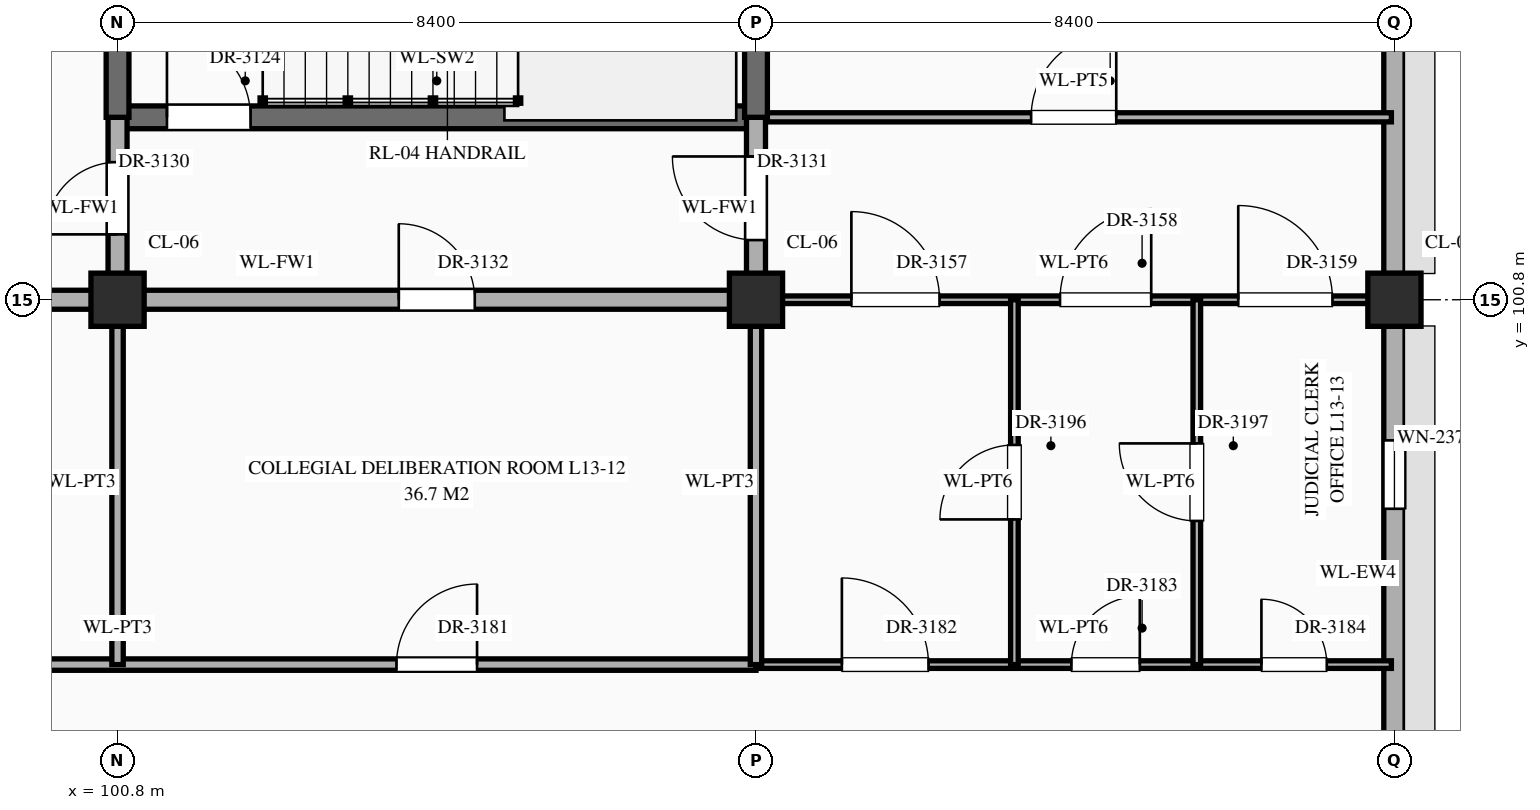
"""IFC4 building model, lengths in metres.
Left out: names, types, materials, properties, quantities, classifications, styles, units other than length and angle.
Written with IfcOpenShell. Run it as: python <this file> out.ifc"""

import sys

from ifc_helpers import new_model, si_unit, direction, frame, frame_2d, origin, origin_2d, place, context, subcontext, project, spatial, rectangle, extrude, element, fill, save


model = new_model("IFC4")
c1 = context("Model", 3, precision=1e-05, world=origin(), true_north=direction((0.0, 1.0)))
c2 = subcontext(c1, "Body", "Model", "MODEL_VIEW")
j1 = project(units=[si_unit("LENGTHUNIT", "METRE"), si_unit("PLANEANGLEUNIT", "RADIAN")], contexts=[c1])
p1 = place(None, origin())
s1 = spatial("IfcSite", under=j1, at=p1, CompositionType="ELEMENT")
p2 = place(p1, origin())
s2 = spatial("IfcBuilding", under=s1, at=p2, CompositionType="ELEMENT")
p3 = place(p2, frame((0.0, 0.0, 56.1)))
s3 = spatial("IfcBuildingStorey", under=s2, at=p3, CompositionType="ELEMENT", Elevation=56.1)
for number, where, z_axis, x_axis in (
    (1, (100.8, 100.8, 0.0), (0.0, 0.0, 1.0), (1.0, 0.0, 0.0)),
    (2, (109.2, 100.8, 0.0), (0.0, 0.0, 1.0), (1.0, 0.0, 0.0)),
    (3, (117.6, 100.8, 0.0), (0.0, 0.0, 1.0), (1.0, 0.0, 0.0)),
):
    element("IfcColumn", number, at=place(p3, frame(where, z_axis=z_axis, x_axis=x_axis)), inside=s3, PredefinedType="COLUMN", context=c2, shape_type="SweptSolid", body=[
        extrude(rectangle(XDim=0.7, YDim=0.7, at=origin_2d()), origin(), (0.0, 0.0, 1.0), 4.2),
    ])
p4 = place(p3, frame((117.6, 93.945, 0.0), z_axis=(0.0, 0.0, 1.0), x_axis=(0.0, 1.0, 0.0)))
e4 = element("IfcWall", 4, at=p4, inside=s3, PredefinedType="STANDARD", context=c2, shape_type="SweptSolid", body=[
    extrude(rectangle(XDim=6.51, YDim=0.28, at=frame_2d((3.255, 0.0))), origin(), (0.0, 0.0, 1.0), 3.2),
])
p5 = place(p4, frame((4.105, 0.0, 0.55)))
e5 = element("IfcOpeningElement", 5, at=p5, cuts=e4, PredefinedType="OPENING", context=c2, shape_type="SweptSolid", body=[
    extrude(rectangle(XDim=0.9, YDim=1.56, at=frame_2d((0.45, 0.78))), frame((0.0, 0.152, 0.0), z_axis=(0.0, -1.0, 0.0), x_axis=(1.0, 0.0, 0.0)), (0.0, 0.0, 1.0), 0.304),
])
p6 = place(p3, frame((117.6, 101.145, 0.0), z_axis=(0.0, 0.0, 1.0), x_axis=(0.0, 1.0, 0.0)))
e6 = element("IfcWall", 6, at=p6, inside=s3, PredefinedType="STANDARD", context=c2, shape_type="SweptSolid", body=[
    extrude(rectangle(XDim=6.51, YDim=0.28, at=frame_2d((3.255, 0.0))), origin(), (0.0, 0.0, 1.0), 3.2),
])
p7 = place(p6, frame((4.105, 0.0, 0.55)))
e7 = element("IfcOpeningElement", 7, at=p7, cuts=e6, PredefinedType="OPENING", context=c2, shape_type="SweptSolid", body=[
    extrude(rectangle(XDim=0.9, YDim=1.74, at=frame_2d((0.45, 0.87))), frame((0.0, 0.152, 0.0), z_axis=(0.0, -1.0, 0.0), x_axis=(1.0, 0.0, 0.0)), (0.0, 0.0, 1.0), 0.304),
])
p8 = place(p3, frame((92.4, 96.0, 0.0), z_axis=(0.0, 0.0, 1.0), x_axis=(1.0, 0.0, 0.0)))
e8 = element("IfcWall", 8, at=p8, inside=s3, PredefinedType="STANDARD", context=c2, shape_type="SweptSolid", body=[
    extrude(rectangle(XDim=16.8, YDim=0.15, at=frame_2d((8.4, 0.0))), origin(), (0.0, 0.0, 1.0), 3.96),
])
p9 = place(p8, frame((3.69, 0.0, 0.0)))
e9 = element("IfcOpeningElement", 9, at=p9, cuts=e8, PredefinedType="OPENING", context=c2, shape_type="SweptSolid", body=[
    extrude(rectangle(XDim=1.02, YDim=2.4, at=frame_2d((0.51, 1.2))), frame((0.0, 0.087, 0.0), z_axis=(0.0, -1.0, 0.0), x_axis=(1.0, 0.0, 0.0)), (0.0, 0.0, 1.0), 0.174),
])
p10 = place(p8, frame((12.07, 0.0, 0.0)))
e10 = element("IfcOpeningElement", 10, at=p10, cuts=e8, PredefinedType="OPENING", context=c2, shape_type="SweptSolid", body=[
    extrude(rectangle(XDim=1.06, YDim=2.4, at=frame_2d((0.53, 1.2))), frame((0.0, 0.087, 0.0), z_axis=(0.0, -1.0, 0.0), x_axis=(1.0, 0.0, 0.0)), (0.0, 0.0, 1.0), 0.174),
])
p11 = place(p3, frame((109.2, 96.0, 0.0), z_axis=(0.0, 0.0, 1.0), x_axis=(1.0, 0.0, 0.0)))
e11 = element("IfcWall", 11, at=p11, inside=s3, PredefinedType="STANDARD", context=c2, shape_type="SweptSolid", body=[
    extrude(rectangle(XDim=8.36, YDim=0.1, at=frame_2d((4.18, 0.0))), origin(), (0.0, 0.0, 1.0), 3.85),
])
p12 = place(p11, frame((1.13, 0.0, 0.0)))
e12 = element("IfcOpeningElement", 12, at=p12, cuts=e11, PredefinedType="OPENING", context=c2, shape_type="SweptSolid", body=[
    extrude(rectangle(XDim=1.14, YDim=2.4, at=frame_2d((0.57, 1.2))), frame((0.0, 0.062, 0.0), z_axis=(0.0, -1.0, 0.0), x_axis=(1.0, 0.0, 0.0)), (0.0, 0.0, 1.0), 0.124),
])
p13 = place(p11, frame((4.15, 0.0, 0.0)))
e13 = element("IfcOpeningElement", 13, at=p13, cuts=e11, PredefinedType="OPENING", context=c2, shape_type="SweptSolid", body=[
    extrude(rectangle(XDim=0.9, YDim=2.15, at=frame_2d((0.45, 1.075))), frame((0.0, 0.062, 0.0), z_axis=(0.0, -1.0, 0.0), x_axis=(1.0, 0.0, 0.0)), (0.0, 0.0, 1.0), 0.124),
])
p14 = place(p11, frame((6.65, 0.0, 0.0)))
e14 = element("IfcOpeningElement", 14, at=p14, cuts=e11, PredefinedType="OPENING", context=c2, shape_type="SweptSolid", body=[
    extrude(rectangle(XDim=0.86, YDim=2.1, at=frame_2d((0.43, 1.05))), frame((0.0, 0.062, 0.0), z_axis=(0.0, -1.0, 0.0), x_axis=(1.0, 0.0, 0.0)), (0.0, 0.0, 1.0), 0.124),
])
p15 = place(p3, frame((96.6, 100.8, 0.0), z_axis=(0.0, 0.0, 1.0), x_axis=(1.0, 0.0, 0.0)))
e15 = element("IfcWall", 15, at=p15, inside=s3, PredefinedType="STANDARD", context=c2, shape_type="SweptSolid", body=[
    extrude(rectangle(XDim=12.6, YDim=0.25, at=frame_2d((6.3, 0.0))), origin(), (0.0, 0.0, 1.0), 3.11),
])
p16 = place(p15, frame((7.9, 0.0, 0.0)))
e16 = element("IfcOpeningElement", 16, at=p16, cuts=e15, PredefinedType="OPENING", context=c2, shape_type="SweptSolid", body=[
    extrude(rectangle(XDim=1.0, YDim=2.2, at=frame_2d((0.5, 1.1))), frame((0.0, 0.137, 0.0), z_axis=(0.0, -1.0, 0.0), x_axis=(1.0, 0.0, 0.0)), (0.0, 0.0, 1.0), 0.274),
])
p17 = place(p3, frame((109.2, 100.8, 0.0), z_axis=(0.0, 0.0, 1.0), x_axis=(1.0, 0.0, 0.0)))
e17 = element("IfcWall", 17, at=p17, inside=s3, PredefinedType="STANDARD", context=c2, shape_type="SweptSolid", body=[
    extrude(rectangle(XDim=8.36, YDim=0.1, at=frame_2d((4.18, 0.0))), origin(), (0.0, 0.0, 1.0), 3.0),
])
p18 = place(p17, frame((1.255, 0.0, 0.0)))
e18 = element("IfcOpeningElement", 18, at=p18, cuts=e17, PredefinedType="OPENING", context=c2, shape_type="SweptSolid", body=[
    extrude(rectangle(XDim=1.16, YDim=2.3, at=frame_2d((0.58, 1.15))), frame((0.0, 0.062, 0.0), z_axis=(0.0, -1.0, 0.0), x_axis=(1.0, 0.0, 0.0)), (0.0, 0.0, 1.0), 0.124),
])
p19 = place(p17, frame((4.0, 0.0, 0.0)))
e19 = element("IfcOpeningElement", 19, at=p19, cuts=e17, PredefinedType="OPENING", context=c2, shape_type="SweptSolid", body=[
    extrude(rectangle(XDim=1.2, YDim=2.35, at=frame_2d((0.6, 1.175))), frame((0.0, 0.062, 0.0), z_axis=(0.0, -1.0, 0.0), x_axis=(1.0, 0.0, 0.0)), (0.0, 0.0, 1.0), 0.124),
])
p20 = place(p17, frame((6.345, 0.0, 0.0)))
e20 = element("IfcOpeningElement", 20, at=p20, cuts=e17, PredefinedType="OPENING", context=c2, shape_type="SweptSolid", body=[
    extrude(rectangle(XDim=1.24, YDim=2.3, at=frame_2d((0.62, 1.15))), frame((0.0, 0.062, 0.0), z_axis=(0.0, -1.0, 0.0), x_axis=(1.0, 0.0, 0.0)), (0.0, 0.0, 1.0), 0.124),
])
p21 = place(p3, frame((100.8, 103.2, 0.0), z_axis=(0.0, 0.0, 1.0), x_axis=(1.0, 0.0, 0.0)))
e21 = element("IfcWall", 21, at=p21, inside=s3, PredefinedType="SHEAR", context=c2, shape_type="SweptSolid", body=[
    extrude(rectangle(XDim=8.4, YDim=0.3, at=frame_2d((4.2, 0.0))), origin(), (0.0, 0.0, 1.0), 3.96),
])
p22 = place(p21, frame((0.65, 0.0, 0.0)))
e22 = element("IfcOpeningElement", 22, at=p22, cuts=e21, PredefinedType="OPENING", context=c2, shape_type="SweptSolid", body=[
    extrude(rectangle(XDim=1.1, YDim=2.2, at=frame_2d((0.55, 1.1))), frame((0.0, 0.162, 0.0), z_axis=(0.0, -1.0, 0.0), x_axis=(1.0, 0.0, 0.0)), (0.0, 0.0, 1.0), 0.324),
])
p23 = place(p3, frame((109.2, 103.2, 0.0), z_axis=(0.0, 0.0, 1.0), x_axis=(1.0, 0.0, 0.0)))
e23 = element("IfcWall", 23, at=p23, inside=s3, PredefinedType="STANDARD", context=c2, shape_type="SweptSolid", body=[
    extrude(rectangle(XDim=8.36, YDim=0.12, at=frame_2d((4.18, 0.0))), origin(), (0.0, 0.0, 1.0), 3.85),
])
p24 = place(p23, frame((3.62, 0.0, 0.0)))
e24 = element("IfcOpeningElement", 24, at=p24, cuts=e23, PredefinedType="OPENING", context=c2, shape_type="SweptSolid", body=[
    extrude(rectangle(XDim=1.12, YDim=2.25, at=frame_2d((0.56, 1.125))), frame((0.0, 0.072, 0.0), z_axis=(0.0, -1.0, 0.0), x_axis=(1.0, 0.0, 0.0)), (0.0, 0.0, 1.0), 0.144),
])
p25 = place(p3, frame((100.8, 96.0, 0.0), z_axis=(0.0, 0.0, 1.0), x_axis=(0.0, 1.0, 0.0)))
e25 = element("IfcWall", 25, at=p25, inside=s3, PredefinedType="STANDARD", context=c2, shape_type="SweptSolid", body=[
    extrude(rectangle(XDim=4.8, YDim=0.15, at=frame_2d((2.4, 0.0))), origin(), (0.0, 0.0, 1.0), 3.21),
])
p26 = place(p3, frame((100.8, 100.8, 0.0), z_axis=(0.0, 0.0, 1.0), x_axis=(0.0, 1.0, 0.0)))
e26 = element("IfcWall", 26, at=p26, inside=s3, PredefinedType="STANDARD", context=c2, shape_type="SweptSolid", body=[
    extrude(rectangle(XDim=2.4, YDim=0.25, at=frame_2d((1.2, 0.0))), origin(), (0.0, 0.0, 1.0), 3.21),
])
p27 = place(p26, frame((0.86, 0.0, 0.0)))
e27 = element("IfcOpeningElement", 27, at=p27, cuts=e26, PredefinedType="OPENING", context=c2, shape_type="SweptSolid", body=[
    extrude(rectangle(XDim=0.95, YDim=2.15, at=frame_2d((0.475, 1.075))), frame((0.0, 0.137, 0.0), z_axis=(0.0, -1.0, 0.0), x_axis=(1.0, 0.0, 0.0)), (0.0, 0.0, 1.0), 0.274),
])
p28 = place(p3, frame((100.8, 103.2, 0.0), z_axis=(0.0, 0.0, 1.0), x_axis=(0.0, 1.0, 0.0)))
e28 = element("IfcWall", 28, at=p28, inside=s3, PredefinedType="SHEAR", context=c2, shape_type="SweptSolid", body=[
    extrude(rectangle(XDim=1.2, YDim=0.3, at=frame_2d((0.6, 0.0))), origin(), (0.0, 0.0, 1.0), 3.96),
])
p29 = place(p3, frame((109.2, 96.0, 0.0), z_axis=(0.0, 0.0, 1.0), x_axis=(0.0, 1.0, 0.0)))
e29 = element("IfcWall", 29, at=p29, inside=s3, PredefinedType="STANDARD", context=c2, shape_type="SweptSolid", body=[
    extrude(rectangle(XDim=4.8, YDim=0.15, at=frame_2d((2.4, 0.0))), origin(), (0.0, 0.0, 1.0), 3.1),
])
p30 = place(p3, frame((109.2, 100.8, 0.0), z_axis=(0.0, 0.0, 1.0), x_axis=(0.0, 1.0, 0.0)))
e30 = element("IfcWall", 30, at=p30, inside=s3, PredefinedType="STANDARD", context=c2, shape_type="SweptSolid", body=[
    extrude(rectangle(XDim=2.4, YDim=0.25, at=frame_2d((1.2, 0.0))), origin(), (0.0, 0.0, 1.0), 3.1),
])
p31 = place(p30, frame((0.785, 0.0, 0.0)))
e31 = element("IfcOpeningElement", 31, at=p31, cuts=e30, PredefinedType="OPENING", context=c2, shape_type="SweptSolid", body=[
    extrude(rectangle(XDim=1.1, YDim=2.2, at=frame_2d((0.55, 1.1))), frame((0.0, 0.137, 0.0), z_axis=(0.0, -1.0, 0.0), x_axis=(1.0, 0.0, 0.0)), (0.0, 0.0, 1.0), 0.274),
])
p32 = place(p3, frame((109.2, 103.2, 0.0), z_axis=(0.0, 0.0, 1.0), x_axis=(0.0, 1.0, 0.0)))
e32 = element("IfcWall", 32, at=p32, inside=s3, PredefinedType="SHEAR", context=c2, shape_type="SweptSolid", body=[
    extrude(rectangle(XDim=4.76, YDim=0.3, at=frame_2d((2.38, 0.0))), origin(), (0.0, 0.0, 1.0), 3.96),
])
p33 = place(p3, frame((112.6, 96.0, 0.0), z_axis=(0.0, 0.0, 1.0), x_axis=(0.0, 1.0, 0.0)))
e33 = element("IfcWall", 33, at=p33, inside=s3, PredefinedType="STANDARD", context=c2, shape_type="SweptSolid", body=[
    extrude(rectangle(XDim=4.8, YDim=0.1, at=frame_2d((2.4, 0.0))), origin(), (0.0, 0.0, 1.0), 3.85),
])
p34 = place(p33, frame((1.91, 0.0, 0.0)))
e34 = element("IfcOpeningElement", 34, at=p34, cuts=e33, PredefinedType="OPENING", context=c2, shape_type="SweptSolid", body=[
    extrude(rectangle(XDim=0.98, YDim=2.35, at=frame_2d((0.49, 1.175))), frame((0.0, 0.062, 0.0), z_axis=(0.0, -1.0, 0.0), x_axis=(1.0, 0.0, 0.0)), (0.0, 0.0, 1.0), 0.124),
])
p35 = place(p3, frame((115.0, 96.0, 0.0), z_axis=(0.0, 0.0, 1.0), x_axis=(0.0, 1.0, 0.0)))
e35 = element("IfcWall", 35, at=p35, inside=s3, PredefinedType="STANDARD", context=c2, shape_type="SweptSolid", body=[
    extrude(rectangle(XDim=4.8, YDim=0.1, at=frame_2d((2.4, 0.0))), origin(), (0.0, 0.0, 1.0), 3.85),
])
p36 = place(p35, frame((1.89, 0.0, 0.0)))
e36 = element("IfcOpeningElement", 36, at=p36, cuts=e35, PredefinedType="OPENING", context=c2, shape_type="SweptSolid", body=[
    extrude(rectangle(XDim=1.02, YDim=2.4, at=frame_2d((0.51, 1.2))), frame((0.0, 0.062, 0.0), z_axis=(0.0, -1.0, 0.0), x_axis=(1.0, 0.0, 0.0)), (0.0, 0.0, 1.0), 0.124),
])
p37 = place(p5, origin())
e37 = element("IfcWindow", 37, at=p37, inside=s3, PartitioningType="SINGLE_PANEL", PredefinedType="WINDOW", context=c2, shape_type="SweptSolid", body=[
    extrude(rectangle(XDim=0.9, YDim=1.56, at=frame_2d((0.45, 0.78))), frame((0.0, 0.03, 0.0), z_axis=(0.0, -1.0, 0.0), x_axis=(1.0, 0.0, 0.0)), (0.0, 0.0, 1.0), 0.06),
])
fill(e5, e37)
p38 = place(p22, origin())
e38 = element("IfcDoor", 38, at=p38, inside=s3, OperationType="SINGLE_SWING_LEFT", PredefinedType="DOOR", context=c2, shape_type="SweptSolid", body=[
    extrude(rectangle(XDim=1.1, YDim=2.2, at=frame_2d((0.55, 1.1))), frame((0.0, 0.025, 0.0), z_axis=(0.0, -1.0, 0.0), x_axis=(1.0, 0.0, 0.0)), (0.0, 0.0, 1.0), 0.05),
])
fill(e22, e38)
p39 = place(p27, origin())
e39 = element("IfcDoor", 39, at=p39, inside=s3, OperationType="SINGLE_SWING_LEFT", PredefinedType="DOOR", context=c2, shape_type="SweptSolid", body=[
    extrude(rectangle(XDim=0.95, YDim=2.15, at=frame_2d((0.475, 1.075))), frame((0.0, 0.025, 0.0), z_axis=(0.0, -1.0, 0.0), x_axis=(1.0, 0.0, 0.0)), (0.0, 0.0, 1.0), 0.05),
])
fill(e27, e39)
p40 = place(p31, origin())
e40 = element("IfcDoor", 40, at=p40, inside=s3, OperationType="SINGLE_SWING_RIGHT", PredefinedType="DOOR", context=c2, shape_type="SweptSolid", body=[
    extrude(rectangle(XDim=1.1, YDim=2.2, at=frame_2d((0.55, 1.1))), frame((0.0, 0.025, 0.0), z_axis=(0.0, -1.0, 0.0), x_axis=(1.0, 0.0, 0.0)), (0.0, 0.0, 1.0), 0.05),
])
fill(e31, e40)
p41 = place(p16, origin())
e41 = element("IfcDoor", 41, at=p41, inside=s3, OperationType="SINGLE_SWING_LEFT", PredefinedType="DOOR", context=c2, shape_type="SweptSolid", body=[
    extrude(rectangle(XDim=1.0, YDim=2.2, at=frame_2d((0.5, 1.1))), frame((0.0, 0.025, 0.0), z_axis=(0.0, -1.0, 0.0), x_axis=(1.0, 0.0, 0.0)), (0.0, 0.0, 1.0), 0.05),
])
fill(e16, e41)
p42 = place(p24, origin())
e42 = element("IfcDoor", 42, at=p42, inside=s3, OperationType="SINGLE_SWING_RIGHT", PredefinedType="DOOR", context=c2, shape_type="SweptSolid", body=[
    extrude(rectangle(XDim=1.12, YDim=2.25, at=frame_2d((0.56, 1.125))), frame((0.0, 0.025, 0.0), z_axis=(0.0, -1.0, 0.0), x_axis=(1.0, 0.0, 0.0)), (0.0, 0.0, 1.0), 0.05),
])
fill(e24, e42)
p43 = place(p18, origin())
e43 = element("IfcDoor", 43, at=p43, inside=s3, OperationType="SINGLE_SWING_LEFT", PredefinedType="DOOR", context=c2, shape_type="SweptSolid", body=[
    extrude(rectangle(XDim=1.16, YDim=2.3, at=frame_2d((0.58, 1.15))), frame((0.0, 0.025, 0.0), z_axis=(0.0, -1.0, 0.0), x_axis=(1.0, 0.0, 0.0)), (0.0, 0.0, 1.0), 0.05),
])
fill(e18, e43)
p44 = place(p19, origin())
e44 = element("IfcDoor", 44, at=p44, inside=s3, OperationType="SINGLE_SWING_RIGHT", PredefinedType="DOOR", context=c2, shape_type="SweptSolid", body=[
    extrude(rectangle(XDim=1.2, YDim=2.35, at=frame_2d((0.6, 1.175))), frame((0.0, 0.025, 0.0), z_axis=(0.0, -1.0, 0.0), x_axis=(1.0, 0.0, 0.0)), (0.0, 0.0, 1.0), 0.05),
])
fill(e19, e44)
p45 = place(p20, origin())
e45 = element("IfcDoor", 45, at=p45, inside=s3, OperationType="SINGLE_SWING_LEFT", PredefinedType="DOOR", context=c2, shape_type="SweptSolid", body=[
    extrude(rectangle(XDim=1.24, YDim=2.3, at=frame_2d((0.62, 1.15))), frame((0.0, 0.025, 0.0), z_axis=(0.0, -1.0, 0.0), x_axis=(1.0, 0.0, 0.0)), (0.0, 0.0, 1.0), 0.05),
])
fill(e20, e45)
p46 = place(p10, origin())
e46 = element("IfcDoor", 46, at=p46, inside=s3, OperationType="SINGLE_SWING_RIGHT", PredefinedType="DOOR", context=c2, shape_type="SweptSolid", body=[
    extrude(rectangle(XDim=1.06, YDim=2.4, at=frame_2d((0.53, 1.2))), frame((0.0, 0.025, 0.0), z_axis=(0.0, -1.0, 0.0), x_axis=(1.0, 0.0, 0.0)), (0.0, 0.0, 1.0), 0.05),
])
fill(e10, e46)
p47 = place(p12, origin())
e47 = element("IfcDoor", 47, at=p47, inside=s3, OperationType="SINGLE_SWING_LEFT", PredefinedType="DOOR", context=c2, shape_type="SweptSolid", body=[
    extrude(rectangle(XDim=1.14, YDim=2.4, at=frame_2d((0.57, 1.2))), frame((0.0, 0.025, 0.0), z_axis=(0.0, -1.0, 0.0), x_axis=(1.0, 0.0, 0.0)), (0.0, 0.0, 1.0), 0.05),
])
fill(e12, e47)
p48 = place(p13, origin())
e48 = element("IfcDoor", 48, at=p48, inside=s3, OperationType="SINGLE_SWING_RIGHT", PredefinedType="DOOR", context=c2, shape_type="SweptSolid", body=[
    extrude(rectangle(XDim=0.9, YDim=2.15, at=frame_2d((0.45, 1.075))), frame((0.0, 0.025, 0.0), z_axis=(0.0, -1.0, 0.0), x_axis=(1.0, 0.0, 0.0)), (0.0, 0.0, 1.0), 0.05),
])
fill(e13, e48)
p49 = place(p14, origin())
e49 = element("IfcDoor", 49, at=p49, inside=s3, OperationType="SINGLE_SWING_LEFT", PredefinedType="DOOR", context=c2, shape_type="SweptSolid", body=[
    extrude(rectangle(XDim=0.86, YDim=2.1, at=frame_2d((0.43, 1.05))), frame((0.0, 0.025, 0.0), z_axis=(0.0, -1.0, 0.0), x_axis=(1.0, 0.0, 0.0)), (0.0, 0.0, 1.0), 0.05),
])
fill(e14, e49)
p50 = place(p34, origin())
e50 = element("IfcDoor", 50, at=p50, inside=s3, OperationType="SINGLE_SWING_LEFT", PredefinedType="DOOR", context=c2, shape_type="SweptSolid", body=[
    extrude(rectangle(XDim=0.98, YDim=2.35, at=frame_2d((0.49, 1.175))), frame((0.0, 0.025, 0.0), z_axis=(0.0, -1.0, 0.0), x_axis=(1.0, 0.0, 0.0)), (0.0, 0.0, 1.0), 0.05),
])
fill(e34, e50)
p51 = place(p36, origin())
e51 = element("IfcDoor", 51, at=p51, inside=s3, OperationType="SINGLE_SWING_RIGHT", PredefinedType="DOOR", context=c2, shape_type="SweptSolid", body=[
    extrude(rectangle(XDim=1.02, YDim=2.4, at=frame_2d((0.51, 1.2))), frame((0.0, 0.025, 0.0), z_axis=(0.0, -1.0, 0.0), x_axis=(1.0, 0.0, 0.0)), (0.0, 0.0, 1.0), 0.05),
])
fill(e36, e51)
save(model, sys.argv[1])
